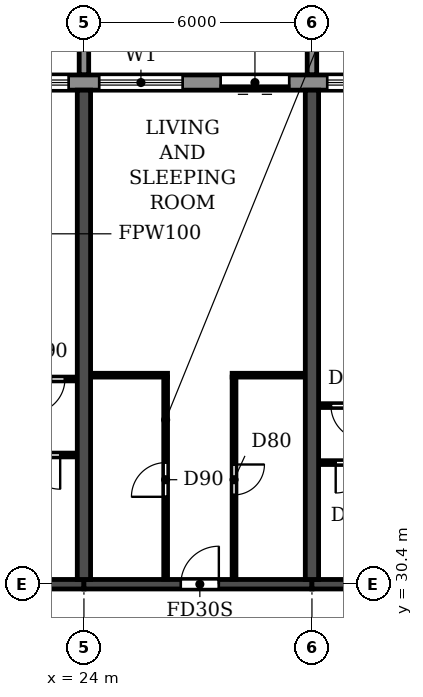
"""IFC4 building model, lengths in metres.
Left out: names, types, materials, properties, quantities, classifications, styles, units other than length and angle.
Written with IfcOpenShell. Run it as: python <this file> out.ifc"""

import sys

from ifc_helpers import new_model, si_unit, direction, frame, frame_2d, origin, place, context, subcontext, project, spatial, polyline, rectangle, outline, extrude, source, transform, mapped, element, fill, save


model = new_model("IFC4")
c1 = context("Model", 3, precision=1e-05, world=origin(), true_north=direction((0.0, 1.0)))
c2 = subcontext(c1, "Body", "Model", "MODEL_VIEW")
j1 = project(units=[si_unit("LENGTHUNIT", "METRE"), si_unit("PLANEANGLEUNIT", "RADIAN")], contexts=[c1])
p1 = place(None, origin())
s1 = spatial("IfcSite", under=j1, at=p1, CompositionType="ELEMENT")
p2 = place(p1, origin())
s2 = spatial("IfcBuilding", under=s1, at=p2, CompositionType="ELEMENT")
p3 = place(p2, frame((0.0, 0.0, 76.2)))
s3 = spatial("IfcBuildingStorey", under=s2, at=p3, CompositionType="ELEMENT", Elevation=76.2)
for number, where, z_axis, x_axis in (
    (1, (24.0, 30.525, 0.0), (0.0, 0.0, 1.0), (0.0, 1.0, 0.0)),
    (2, (30.0, 30.525, 0.0), (0.0, 0.0, 1.0), (0.0, 1.0, 0.0)),
):
    element("IfcWall", number, at=place(p3, frame(where, z_axis=z_axis, x_axis=x_axis)), inside=s3, PredefinedType="SHEAR", context=c2, shape_type="SweptSolid", body=[
        extrude(rectangle(XDim=12.875, YDim=0.35, at=frame_2d((6.438, 0.0))), origin(), (0.0, 0.0, 1.0), 3.06),
    ])
p4 = place(p3, frame((18.0, 30.4, 0.0), z_axis=(0.0, 0.0, 1.0), x_axis=(1.0, 0.0, 0.0)))
e3 = element("IfcWall", 3, at=p4, inside=s3, PredefinedType="SHEAR", context=c2, shape_type="SweptSolid", body=[
    extrude(rectangle(XDim=6.0, YDim=0.25, at=frame_2d((3.0, 0.0))), origin(), (0.0, 0.0, 1.0), 2.46),
])
p5 = place(p4, frame((2.45, 0.0, 0.0)))
e4 = element("IfcOpeningElement", 4, at=p5, cuts=e3, PredefinedType="OPENING", context=c2, shape_type="SweptSolid", body=[
    extrude(rectangle(XDim=1.0, YDim=2.1, at=frame_2d((0.5, 1.05))), frame((0.0, 0.135, 0.0), z_axis=(0.0, -1.0, 0.0), x_axis=(1.0, 0.0, 0.0)), (0.0, 0.0, 1.0), 0.27),
])
p6 = place(p3, frame((24.0, 30.4, 0.0), z_axis=(0.0, 0.0, 1.0), x_axis=(1.0, 0.0, 0.0)))
e5 = element("IfcWall", 5, at=p6, inside=s3, PredefinedType="SHEAR", context=c2, shape_type="SweptSolid", body=[
    extrude(rectangle(XDim=6.0, YDim=0.25, at=frame_2d((3.0, 0.0))), origin(), (0.0, 0.0, 1.0), 2.46),
])
p7 = place(p6, frame((2.55, 0.0, 0.0)))
e6 = element("IfcOpeningElement", 6, at=p7, cuts=e5, PredefinedType="OPENING", context=c2, shape_type="SweptSolid", body=[
    extrude(rectangle(XDim=1.0, YDim=2.1, at=frame_2d((0.5, 1.05))), frame((0.0, 0.135, 0.0), z_axis=(0.0, -1.0, 0.0), x_axis=(1.0, 0.0, 0.0)), (0.0, 0.0, 1.0), 0.27),
])
p8 = place(p3, frame((30.0, 30.4, 0.0), z_axis=(0.0, 0.0, 1.0), x_axis=(1.0, 0.0, 0.0)))
e7 = element("IfcWall", 7, at=p8, inside=s3, PredefinedType="SHEAR", context=c2, shape_type="SweptSolid", body=[
    extrude(rectangle(XDim=6.0, YDim=0.25, at=frame_2d((3.0, 0.0))), origin(), (0.0, 0.0, 1.0), 2.46),
])
p9 = place(p8, frame((2.45, 0.0, 0.0)))
e8 = element("IfcOpeningElement", 8, at=p9, cuts=e7, PredefinedType="OPENING", context=c2, shape_type="SweptSolid", body=[
    extrude(rectangle(XDim=1.0, YDim=2.1, at=frame_2d((0.5, 1.05))), frame((0.0, 0.135, 0.0), z_axis=(0.0, -1.0, 0.0), x_axis=(1.0, 0.0, 0.0)), (0.0, 0.0, 1.0), 0.27),
])
p10 = place(p3, frame((91.317, 43.6, 0.0), z_axis=(0.0, 0.0, 1.0), x_axis=(-1.0, 0.0, 0.0)))
e9 = element("IfcWall", 9, at=p10, inside=s3, PredefinedType="STANDARD", context=c2, shape_type="SweptSolid", body=[
    extrude(rectangle(XDim=80.634, YDim=0.4, at=frame_2d((40.317, 0.0))), origin(), (0.0, 0.0, 1.0), 3.06),
])
p11 = place(p10, frame((76.717, 0.0, 0.9)))
e10 = element("IfcOpeningElement", 10, at=p11, cuts=e9, PredefinedType="OPENING", context=c2, shape_type="SweptSolid", body=[
    extrude(rectangle(XDim=2.2, YDim=1.5, at=frame_2d((1.1, 0.75))), frame((0.0, 0.21, 0.0), z_axis=(0.0, -1.0, 0.0), x_axis=(1.0, 0.0, 0.0)), (0.0, 0.0, 1.0), 0.42),
])
p12 = place(p10, frame((73.917, 0.0, 0.0)))
e11 = element("IfcOpeningElement", 11, at=p12, cuts=e9, PredefinedType="OPENING", context=c2, shape_type="SweptSolid", body=[
    extrude(rectangle(XDim=1.8, YDim=2.4, at=frame_2d((0.9, 1.2))), frame((0.0, 0.21, 0.0), z_axis=(0.0, -1.0, 0.0), x_axis=(1.0, 0.0, 0.0)), (0.0, 0.0, 1.0), 0.42),
])
p13 = place(p10, frame((70.917, 0.0, 0.0)))
e12 = element("IfcOpeningElement", 12, at=p13, cuts=e9, PredefinedType="OPENING", context=c2, shape_type="SweptSolid", body=[
    extrude(rectangle(XDim=1.8, YDim=2.4, at=frame_2d((0.9, 1.2))), frame((0.0, 0.21, 0.0), z_axis=(0.0, -1.0, 0.0), x_axis=(1.0, 0.0, 0.0)), (0.0, 0.0, 1.0), 0.42),
])
p14 = place(p10, frame((67.717, 0.0, 0.9)))
e13 = element("IfcOpeningElement", 13, at=p14, cuts=e9, PredefinedType="OPENING", context=c2, shape_type="SweptSolid", body=[
    extrude(rectangle(XDim=2.2, YDim=1.5, at=frame_2d((1.1, 0.75))), frame((0.0, 0.21, 0.0), z_axis=(0.0, -1.0, 0.0), x_axis=(1.0, 0.0, 0.0)), (0.0, 0.0, 1.0), 0.42),
])
p15 = place(p10, frame((64.717, 0.0, 0.9)))
e14 = element("IfcOpeningElement", 14, at=p15, cuts=e9, PredefinedType="OPENING", context=c2, shape_type="SweptSolid", body=[
    extrude(rectangle(XDim=2.2, YDim=1.5, at=frame_2d((1.1, 0.75))), frame((0.0, 0.21, 0.0), z_axis=(0.0, -1.0, 0.0), x_axis=(1.0, 0.0, 0.0)), (0.0, 0.0, 1.0), 0.42),
])
p16 = place(p10, frame((61.917, 0.0, 0.0)))
e15 = element("IfcOpeningElement", 15, at=p16, cuts=e9, PredefinedType="OPENING", context=c2, shape_type="SweptSolid", body=[
    extrude(rectangle(XDim=1.8, YDim=2.4, at=frame_2d((0.9, 1.2))), frame((0.0, 0.21, 0.0), z_axis=(0.0, -1.0, 0.0), x_axis=(1.0, 0.0, 0.0)), (0.0, 0.0, 1.0), 0.42),
])
p17 = place(p10, frame((58.717, 0.0, 0.9)))
e16 = element("IfcOpeningElement", 16, at=p17, cuts=e9, PredefinedType="OPENING", context=c2, shape_type="SweptSolid", body=[
    extrude(rectangle(XDim=2.2, YDim=1.5, at=frame_2d((1.1, 0.75))), frame((0.0, 0.21, 0.0), z_axis=(0.0, -1.0, 0.0), x_axis=(1.0, 0.0, 0.0)), (0.0, 0.0, 1.0), 0.42),
])
p18 = place(p10, frame((55.917, 0.0, 0.0)))
e17 = element("IfcOpeningElement", 17, at=p18, cuts=e9, PredefinedType="OPENING", context=c2, shape_type="SweptSolid", body=[
    extrude(rectangle(XDim=1.8, YDim=2.4, at=frame_2d((0.9, 1.2))), frame((0.0, 0.21, 0.0), z_axis=(0.0, -1.0, 0.0), x_axis=(1.0, 0.0, 0.0)), (0.0, 0.0, 1.0), 0.42),
])
p19 = place(p10, frame((52.717, 0.0, 0.9)))
e18 = element("IfcOpeningElement", 18, at=p19, cuts=e9, PredefinedType="OPENING", context=c2, shape_type="SweptSolid", body=[
    extrude(rectangle(XDim=2.2, YDim=1.5, at=frame_2d((1.1, 0.75))), frame((0.0, 0.21, 0.0), z_axis=(0.0, -1.0, 0.0), x_axis=(1.0, 0.0, 0.0)), (0.0, 0.0, 1.0), 0.42),
])
p20 = place(p10, frame((49.717, 0.0, 0.9)))
e19 = element("IfcOpeningElement", 19, at=p20, cuts=e9, PredefinedType="OPENING", context=c2, shape_type="SweptSolid", body=[
    extrude(rectangle(XDim=2.2, YDim=1.5, at=frame_2d((1.1, 0.75))), frame((0.0, 0.21, 0.0), z_axis=(0.0, -1.0, 0.0), x_axis=(1.0, 0.0, 0.0)), (0.0, 0.0, 1.0), 0.42),
])
p21 = place(p10, frame((46.917, 0.0, 0.0)))
e20 = element("IfcOpeningElement", 20, at=p21, cuts=e9, PredefinedType="OPENING", context=c2, shape_type="SweptSolid", body=[
    extrude(rectangle(XDim=1.8, YDim=2.4, at=frame_2d((0.9, 1.2))), frame((0.0, 0.21, 0.0), z_axis=(0.0, -1.0, 0.0), x_axis=(1.0, 0.0, 0.0)), (0.0, 0.0, 1.0), 0.42),
])
p22 = place(p10, frame((43.717, 0.0, 0.9)))
e21 = element("IfcOpeningElement", 21, at=p22, cuts=e9, PredefinedType="OPENING", context=c2, shape_type="SweptSolid", body=[
    extrude(rectangle(XDim=2.2, YDim=1.5, at=frame_2d((1.1, 0.75))), frame((0.0, 0.21, 0.0), z_axis=(0.0, -1.0, 0.0), x_axis=(1.0, 0.0, 0.0)), (0.0, 0.0, 1.0), 0.42),
])
p23 = place(p10, frame((40.717, 0.0, 0.9)))
e22 = element("IfcOpeningElement", 22, at=p23, cuts=e9, PredefinedType="OPENING", context=c2, shape_type="SweptSolid", body=[
    extrude(rectangle(XDim=2.2, YDim=1.5, at=frame_2d((1.1, 0.75))), frame((0.0, 0.21, 0.0), z_axis=(0.0, -1.0, 0.0), x_axis=(1.0, 0.0, 0.0)), (0.0, 0.0, 1.0), 0.42),
])
p24 = place(p10, frame((37.917, 0.0, 0.0)))
e23 = element("IfcOpeningElement", 23, at=p24, cuts=e9, PredefinedType="OPENING", context=c2, shape_type="SweptSolid", body=[
    extrude(rectangle(XDim=1.8, YDim=2.4, at=frame_2d((0.9, 1.2))), frame((0.0, 0.21, 0.0), z_axis=(0.0, -1.0, 0.0), x_axis=(1.0, 0.0, 0.0)), (0.0, 0.0, 1.0), 0.42),
])
p25 = place(p10, frame((34.717, 0.0, 0.9)))
e24 = element("IfcOpeningElement", 24, at=p25, cuts=e9, PredefinedType="OPENING", context=c2, shape_type="SweptSolid", body=[
    extrude(rectangle(XDim=2.2, YDim=1.5, at=frame_2d((1.1, 0.75))), frame((0.0, 0.21, 0.0), z_axis=(0.0, -1.0, 0.0), x_axis=(1.0, 0.0, 0.0)), (0.0, 0.0, 1.0), 0.42),
])
p26 = place(p10, frame((31.917, 0.0, 0.0)))
e25 = element("IfcOpeningElement", 25, at=p26, cuts=e9, PredefinedType="OPENING", context=c2, shape_type="SweptSolid", body=[
    extrude(rectangle(XDim=1.8, YDim=2.4, at=frame_2d((0.9, 1.2))), frame((0.0, 0.21, 0.0), z_axis=(0.0, -1.0, 0.0), x_axis=(1.0, 0.0, 0.0)), (0.0, 0.0, 1.0), 0.42),
])
p27 = place(p10, frame((28.717, 0.0, 0.9)))
e26 = element("IfcOpeningElement", 26, at=p27, cuts=e9, PredefinedType="OPENING", context=c2, shape_type="SweptSolid", body=[
    extrude(rectangle(XDim=2.2, YDim=1.5, at=frame_2d((1.1, 0.75))), frame((0.0, 0.21, 0.0), z_axis=(0.0, -1.0, 0.0), x_axis=(1.0, 0.0, 0.0)), (0.0, 0.0, 1.0), 0.42),
])
p28 = place(p10, frame((25.717, 0.0, 0.9)))
e27 = element("IfcOpeningElement", 27, at=p28, cuts=e9, PredefinedType="OPENING", context=c2, shape_type="SweptSolid", body=[
    extrude(rectangle(XDim=2.2, YDim=1.5, at=frame_2d((1.1, 0.75))), frame((0.0, 0.21, 0.0), z_axis=(0.0, -1.0, 0.0), x_axis=(1.0, 0.0, 0.0)), (0.0, 0.0, 1.0), 0.42),
])
p29 = place(p10, frame((22.717, 0.0, 0.9)))
e28 = element("IfcOpeningElement", 28, at=p29, cuts=e9, PredefinedType="OPENING", context=c2, shape_type="SweptSolid", body=[
    extrude(rectangle(XDim=2.2, YDim=1.5, at=frame_2d((1.1, 0.75))), frame((0.0, 0.21, 0.0), z_axis=(0.0, -1.0, 0.0), x_axis=(1.0, 0.0, 0.0)), (0.0, 0.0, 1.0), 0.42),
])
p30 = place(p10, frame((19.917, 0.0, 0.0)))
e29 = element("IfcOpeningElement", 29, at=p30, cuts=e9, PredefinedType="OPENING", context=c2, shape_type="SweptSolid", body=[
    extrude(rectangle(XDim=1.8, YDim=2.4, at=frame_2d((0.9, 1.2))), frame((0.0, 0.21, 0.0), z_axis=(0.0, -1.0, 0.0), x_axis=(1.0, 0.0, 0.0)), (0.0, 0.0, 1.0), 0.42),
])
p31 = place(p10, frame((16.717, 0.0, 0.9)))
e30 = element("IfcOpeningElement", 30, at=p31, cuts=e9, PredefinedType="OPENING", context=c2, shape_type="SweptSolid", body=[
    extrude(rectangle(XDim=2.2, YDim=1.5, at=frame_2d((1.1, 0.75))), frame((0.0, 0.21, 0.0), z_axis=(0.0, -1.0, 0.0), x_axis=(1.0, 0.0, 0.0)), (0.0, 0.0, 1.0), 0.42),
])
p32 = place(p10, frame((13.717, 0.0, 0.9)))
e31 = element("IfcOpeningElement", 31, at=p32, cuts=e9, PredefinedType="OPENING", context=c2, shape_type="SweptSolid", body=[
    extrude(rectangle(XDim=2.2, YDim=1.5, at=frame_2d((1.1, 0.75))), frame((0.0, 0.21, 0.0), z_axis=(0.0, -1.0, 0.0), x_axis=(1.0, 0.0, 0.0)), (0.0, 0.0, 1.0), 0.42),
])
p33 = place(p10, frame((10.717, 0.0, 0.9)))
e32 = element("IfcOpeningElement", 32, at=p33, cuts=e9, PredefinedType="OPENING", context=c2, shape_type="SweptSolid", body=[
    extrude(rectangle(XDim=2.2, YDim=1.5, at=frame_2d((1.1, 0.75))), frame((0.0, 0.21, 0.0), z_axis=(0.0, -1.0, 0.0), x_axis=(1.0, 0.0, 0.0)), (0.0, 0.0, 1.0), 0.42),
])
p34 = place(p10, frame((7.917, 0.0, 0.0)))
e33 = element("IfcOpeningElement", 33, at=p34, cuts=e9, PredefinedType="OPENING", context=c2, shape_type="SweptSolid", body=[
    extrude(rectangle(XDim=1.8, YDim=2.4, at=frame_2d((0.9, 1.2))), frame((0.0, 0.21, 0.0), z_axis=(0.0, -1.0, 0.0), x_axis=(1.0, 0.0, 0.0)), (0.0, 0.0, 1.0), 0.42),
])
p35 = place(p10, frame((4.717, 0.0, 0.9)))
e34 = element("IfcOpeningElement", 34, at=p35, cuts=e9, PredefinedType="OPENING", context=c2, shape_type="SweptSolid", body=[
    extrude(rectangle(XDim=2.2, YDim=1.5, at=frame_2d((1.1, 0.75))), frame((0.0, 0.21, 0.0), z_axis=(0.0, -1.0, 0.0), x_axis=(1.0, 0.0, 0.0)), (0.0, 0.0, 1.0), 0.42),
])
p36 = place(p10, frame((1.917, 0.0, 0.0)))
e35 = element("IfcOpeningElement", 35, at=p36, cuts=e9, PredefinedType="OPENING", context=c2, shape_type="SweptSolid", body=[
    extrude(rectangle(XDim=1.8, YDim=2.4, at=frame_2d((0.9, 1.2))), frame((0.0, 0.21, 0.0), z_axis=(0.0, -1.0, 0.0), x_axis=(1.0, 0.0, 0.0)), (0.0, 0.0, 1.0), 0.42),
])
m1 = source(origin(), c2, "Body", "SweptSolid", [
    extrude(outline(polyline([(0.0, 0.0), (0.25, 0.0), (0.25, 3.1), (0.0, 3.1), (0.0, 0.0)])), origin(), (0.0, 0.0, 1.0), 3.1),
])
for number, where in (
    (36, (23.875, 43.8, 0.0)),
    (37, (29.875, 43.8, 0.0)),
):
    element("IfcWall", number, at=place(p3, frame(where)), inside=s3, PredefinedType="STANDARD", context=c2, shape_type="MappedRepresentation", body=[
        mapped(m1, transform((0.0, 0.0, 0.0))),
    ])
p37 = place(p3, frame((30.185, 33.6, 0.0), z_axis=(0.0, 0.0, 1.0), x_axis=(1.0, 0.0, 0.0)))
e38 = element("IfcWall", 38, at=p37, inside=s3, PredefinedType="PARTITIONING", context=c2, shape_type="SweptSolid", body=[
    extrude(rectangle(XDim=1.915, YDim=0.1, at=frame_2d((0.958, 0.0))), origin(), (0.0, 0.0, 1.0), 3.06),
])
p38 = place(p37, frame((0.44, 0.0, 0.0)))
e39 = element("IfcOpeningElement", 39, at=p38, cuts=e38, PredefinedType="OPENING", context=c2, shape_type="SweptSolid", body=[
    extrude(rectangle(XDim=0.8, YDim=2.1, at=frame_2d((0.4, 1.05))), frame((0.0, 0.06, 0.0), z_axis=(0.0, -1.0, 0.0), x_axis=(1.0, 0.0, 0.0)), (0.0, 0.0, 1.0), 0.12),
])
p39 = place(p3, frame((21.8, 33.8, 0.0), z_axis=(0.0, 0.0, 1.0), x_axis=(1.0, 0.0, 0.0)))
e40 = element("IfcWall", 40, at=p39, inside=s3, PredefinedType="PARTITIONING", context=c2, shape_type="SweptSolid", body=[
    extrude(rectangle(XDim=2.015, YDim=0.1, at=frame_2d((1.007, 0.0))), origin(), (0.0, 0.0, 1.0), 3.06),
])
p40 = place(p39, frame((0.675, 0.0, 0.0)))
e41 = element("IfcOpeningElement", 41, at=p40, cuts=e40, PredefinedType="OPENING", context=c2, shape_type="SweptSolid", body=[
    extrude(rectangle(XDim=0.9, YDim=2.1, at=frame_2d((0.45, 1.05))), frame((0.0, 0.06, 0.0), z_axis=(0.0, -1.0, 0.0), x_axis=(1.0, 0.0, 0.0)), (0.0, 0.0, 1.0), 0.12),
])
p41 = place(p3, frame((30.185, 35.1, 0.0), z_axis=(0.0, 0.0, 1.0), x_axis=(1.0, 0.0, 0.0)))
e42 = element("IfcWall", 42, at=p41, inside=s3, PredefinedType="PARTITIONING", context=c2, shape_type="SweptSolid", body=[
    extrude(rectangle(XDim=2.865, YDim=0.1, at=frame_2d((1.433, 0.0))), origin(), (0.0, 0.0, 1.0), 3.06),
])
p42 = place(p41, frame((0.315, 0.0, 0.0)))
e43 = element("IfcOpeningElement", 43, at=p42, cuts=e42, PredefinedType="OPENING", context=c2, shape_type="SweptSolid", body=[
    extrude(rectangle(XDim=0.9, YDim=2.1, at=frame_2d((0.45, 1.05))), frame((0.0, 0.06, 0.0), z_axis=(0.0, -1.0, 0.0), x_axis=(1.0, 0.0, 0.0)), (0.0, 0.0, 1.0), 0.12),
])
p43 = place(p3, frame((20.95, 35.8, 0.0), z_axis=(0.0, 0.0, 1.0), x_axis=(1.0, 0.0, 0.0)))
e44 = element("IfcWall", 44, at=p43, inside=s3, PredefinedType="PARTITIONING", context=c2, shape_type="SweptSolid", body=[
    extrude(rectangle(XDim=2.865, YDim=0.1, at=frame_2d((1.433, 0.0))), origin(), (0.0, 0.0, 1.0), 3.06),
])
p44 = place(p43, frame((1.65, 0.0, 0.0)))
e45 = element("IfcOpeningElement", 45, at=p44, cuts=e44, PredefinedType="OPENING", context=c2, shape_type="SweptSolid", body=[
    extrude(rectangle(XDim=0.9, YDim=2.1, at=frame_2d((0.45, 1.05))), frame((0.0, 0.06, 0.0), z_axis=(0.0, -1.0, 0.0), x_axis=(1.0, 0.0, 0.0)), (0.0, 0.0, 1.0), 0.12),
])
p45 = place(p3, frame((24.185, 35.9, 0.0), z_axis=(0.0, 0.0, 1.0), x_axis=(1.0, 0.0, 0.0)))
e46 = element("IfcWall", 46, at=p45, inside=s3, PredefinedType="PARTITIONING", context=c2, shape_type="SweptSolid", body=[
    extrude(rectangle(XDim=2.015, YDim=0.1, at=frame_2d((1.007, 0.0))), origin(), (0.0, 0.0, 1.0), 3.06),
])
p46 = place(p3, frame((27.9, 35.9, 0.0), z_axis=(0.0, 0.0, 1.0), x_axis=(1.0, 0.0, 0.0)))
e47 = element("IfcWall", 47, at=p46, inside=s3, PredefinedType="PARTITIONING", context=c2, shape_type="SweptSolid", body=[
    extrude(rectangle(XDim=1.915, YDim=0.1, at=frame_2d((0.958, 0.0))), origin(), (0.0, 0.0, 1.0), 3.06),
])
p47 = place(p3, frame((26.15, 30.535, 0.0), z_axis=(0.0, 0.0, 1.0), x_axis=(0.0, 1.0, 0.0)))
e48 = element("IfcWall", 48, at=p47, inside=s3, PredefinedType="PARTITIONING", context=c2, shape_type="SweptSolid", body=[
    extrude(rectangle(XDim=5.315, YDim=0.1, at=frame_2d((2.658, 0.0))), origin(), (0.0, 0.0, 1.0), 3.06),
])
p48 = place(p47, frame((2.165, 0.0, 0.0)))
e49 = element("IfcOpeningElement", 49, at=p48, cuts=e48, PredefinedType="OPENING", context=c2, shape_type="SweptSolid", body=[
    extrude(rectangle(XDim=0.9, YDim=2.1, at=frame_2d((0.45, 1.05))), frame((0.0, 0.06, 0.0), z_axis=(0.0, -1.0, 0.0), x_axis=(1.0, 0.0, 0.0)), (0.0, 0.0, 1.0), 0.12),
])
p49 = place(p3, frame((27.95, 30.535, 0.0), z_axis=(0.0, 0.0, 1.0), x_axis=(0.0, 1.0, 0.0)))
e50 = element("IfcWall", 50, at=p49, inside=s3, PredefinedType="PARTITIONING", context=c2, shape_type="SweptSolid", body=[
    extrude(rectangle(XDim=5.315, YDim=0.1, at=frame_2d((2.658, 0.0))), origin(), (0.0, 0.0, 1.0), 3.06),
])
p50 = place(p49, frame((2.215, 0.0, 0.0)))
e51 = element("IfcOpeningElement", 51, at=p50, cuts=e50, PredefinedType="OPENING", context=c2, shape_type="SweptSolid", body=[
    extrude(rectangle(XDim=0.8, YDim=2.1, at=frame_2d((0.4, 1.05))), frame((0.0, 0.06, 0.0), z_axis=(0.0, -1.0, 0.0), x_axis=(1.0, 0.0, 0.0)), (0.0, 0.0, 1.0), 0.12),
])
p51 = place(p14, origin())
e52 = element("IfcWindow", 52, at=p51, inside=s3, PartitioningType="DOUBLE_PANEL_HORIZONTAL", PredefinedType="WINDOW", context=c2, shape_type="SweptSolid", body=[
    extrude(rectangle(XDim=2.2, YDim=1.5, at=frame_2d((1.1, 0.75))), frame((0.0, 0.03, 0.0), z_axis=(0.0, -1.0, 0.0), x_axis=(1.0, 0.0, 0.0)), (0.0, 0.0, 1.0), 0.06),
])
fill(e13, e52)
p52 = place(p15, origin())
e53 = element("IfcWindow", 53, at=p52, inside=s3, PartitioningType="DOUBLE_PANEL_HORIZONTAL", PredefinedType="WINDOW", context=c2, shape_type="SweptSolid", body=[
    extrude(rectangle(XDim=2.2, YDim=1.5, at=frame_2d((1.1, 0.75))), frame((0.0, 0.03, 0.0), z_axis=(0.0, -1.0, 0.0), x_axis=(1.0, 0.0, 0.0)), (0.0, 0.0, 1.0), 0.06),
])
fill(e14, e53)
p53 = place(p16, origin())
e54 = element("IfcDoor", 54, at=p53, inside=s3, OperationType="DOUBLE_DOOR_SLIDING", PredefinedType="DOOR", context=c2, shape_type="SweptSolid", body=[
    extrude(rectangle(XDim=1.8, YDim=2.4, at=frame_2d((0.9, 1.2))), frame((0.0, 0.025, 0.0), z_axis=(0.0, -1.0, 0.0), x_axis=(1.0, 0.0, 0.0)), (0.0, 0.0, 1.0), 0.05),
])
fill(e15, e54)
p54 = place(p17, origin())
e55 = element("IfcWindow", 55, at=p54, inside=s3, PartitioningType="DOUBLE_PANEL_HORIZONTAL", PredefinedType="WINDOW", context=c2, shape_type="SweptSolid", body=[
    extrude(rectangle(XDim=2.2, YDim=1.5, at=frame_2d((1.1, 0.75))), frame((0.0, 0.03, 0.0), z_axis=(0.0, -1.0, 0.0), x_axis=(1.0, 0.0, 0.0)), (0.0, 0.0, 1.0), 0.06),
])
fill(e16, e55)
p55 = place(p40, frame((0.9, 0.0, 0.0), z_axis=(0.0, 0.0, 1.0), x_axis=(-1.0, 0.0, 0.0)))
e56 = element("IfcDoor", 56, at=p55, inside=s3, OperationType="SINGLE_SWING_LEFT", PredefinedType="DOOR", context=c2, shape_type="SweptSolid", body=[
    extrude(rectangle(XDim=0.9, YDim=2.1, at=frame_2d((0.45, 1.05))), frame((0.0, 0.025, 0.0), z_axis=(0.0, -1.0, 0.0), x_axis=(1.0, 0.0, 0.0)), (0.0, 0.0, 1.0), 0.05),
])
fill(e41, e56)
p56 = place(p44, frame((0.9, 0.0, 0.0), z_axis=(0.0, 0.0, 1.0), x_axis=(-1.0, 0.0, 0.0)))
e57 = element("IfcDoor", 57, at=p56, inside=s3, OperationType="SINGLE_SWING_RIGHT", PredefinedType="DOOR", context=c2, shape_type="SweptSolid", body=[
    extrude(rectangle(XDim=0.9, YDim=2.1, at=frame_2d((0.45, 1.05))), frame((0.0, 0.025, 0.0), z_axis=(0.0, -1.0, 0.0), x_axis=(1.0, 0.0, 0.0)), (0.0, 0.0, 1.0), 0.05),
])
fill(e45, e57)
p57 = place(p48, origin())
e58 = element("IfcDoor", 58, at=p57, inside=s3, OperationType="SINGLE_SWING_LEFT", PredefinedType="DOOR", context=c2, shape_type="SweptSolid", body=[
    extrude(rectangle(XDim=0.9, YDim=2.1, at=frame_2d((0.45, 1.05))), frame((0.0, 0.025, 0.0), z_axis=(0.0, -1.0, 0.0), x_axis=(1.0, 0.0, 0.0)), (0.0, 0.0, 1.0), 0.05),
])
fill(e49, e58)
p58 = place(p7, origin())
e59 = element("IfcDoor", 59, at=p58, inside=s3, OperationType="SINGLE_SWING_RIGHT", PredefinedType="DOOR", context=c2, shape_type="SweptSolid", body=[
    extrude(rectangle(XDim=1.0, YDim=2.1, at=frame_2d((0.5, 1.05))), frame((0.0, 0.025, 0.0), z_axis=(0.0, -1.0, 0.0), x_axis=(1.0, 0.0, 0.0)), (0.0, 0.0, 1.0), 0.05),
])
fill(e6, e59)
p59 = place(p50, frame((0.8, 0.0, 0.0), z_axis=(0.0, 0.0, 1.0), x_axis=(-1.0, 0.0, 0.0)))
e60 = element("IfcDoor", 60, at=p59, inside=s3, OperationType="SINGLE_SWING_LEFT", PredefinedType="DOOR", context=c2, shape_type="SweptSolid", body=[
    extrude(rectangle(XDim=0.8, YDim=2.1, at=frame_2d((0.4, 1.05))), frame((0.0, 0.025, 0.0), z_axis=(0.0, -1.0, 0.0), x_axis=(1.0, 0.0, 0.0)), (0.0, 0.0, 1.0), 0.05),
])
fill(e51, e60)
p60 = place(p42, frame((0.9, 0.0, 0.0), z_axis=(0.0, 0.0, 1.0), x_axis=(-1.0, 0.0, 0.0)))
e61 = element("IfcDoor", 61, at=p60, inside=s3, OperationType="SINGLE_SWING_LEFT", PredefinedType="DOOR", context=c2, shape_type="SweptSolid", body=[
    extrude(rectangle(XDim=0.9, YDim=2.1, at=frame_2d((0.45, 1.05))), frame((0.0, 0.025, 0.0), z_axis=(0.0, -1.0, 0.0), x_axis=(1.0, 0.0, 0.0)), (0.0, 0.0, 1.0), 0.05),
])
fill(e43, e61)
p61 = place(p38, frame((0.8, 0.0, 0.0), z_axis=(0.0, 0.0, 1.0), x_axis=(-1.0, 0.0, 0.0)))
e62 = element("IfcDoor", 62, at=p61, inside=s3, OperationType="SINGLE_SWING_RIGHT", PredefinedType="DOOR", context=c2, shape_type="SweptSolid", body=[
    extrude(rectangle(XDim=0.8, YDim=2.1, at=frame_2d((0.4, 1.05))), frame((0.0, 0.025, 0.0), z_axis=(0.0, -1.0, 0.0), x_axis=(1.0, 0.0, 0.0)), (0.0, 0.0, 1.0), 0.05),
])
fill(e39, e62)
save(model, sys.argv[1])
